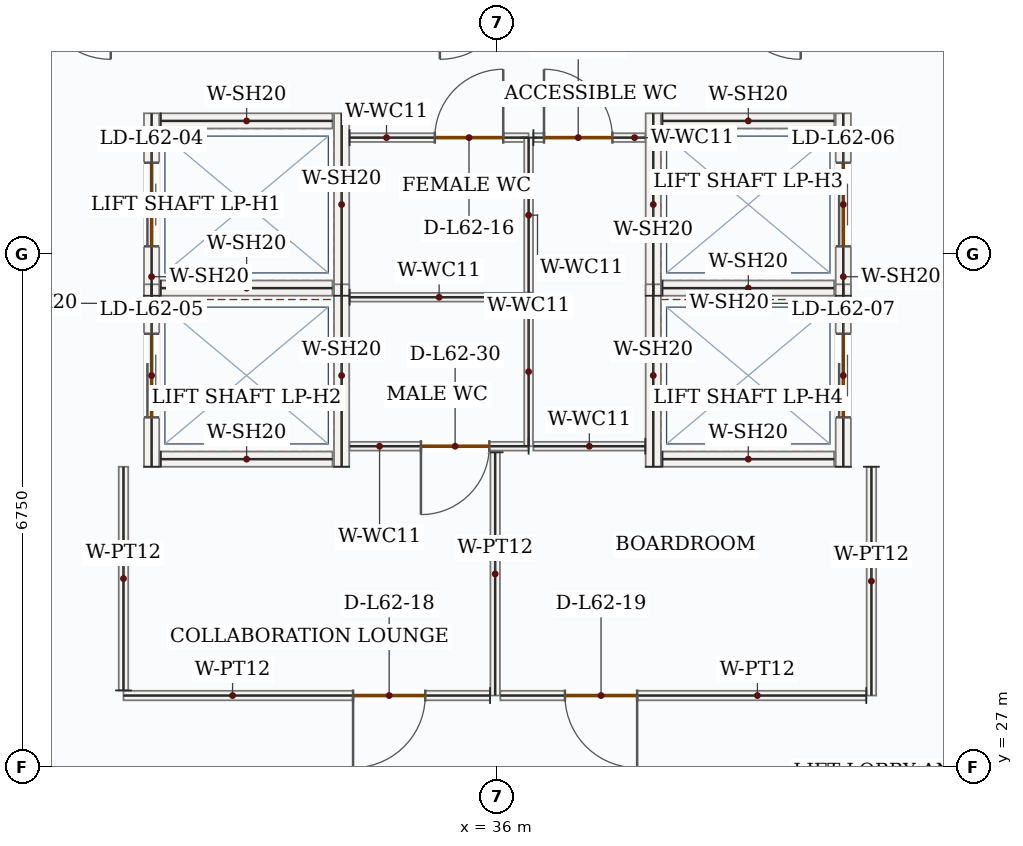
"""IFC4 building model, lengths in metres.
Left out: names, types, materials, properties, quantities, classifications, styles, units other than length and angle.
Written with IfcOpenShell. Run it as: python <this file> out.ifc"""

import sys

from ifc_helpers import new_model, si_unit, direction, frame, frame_2d, origin, place, context, subcontext, project, spatial, rectangle, extrude, source, transform, mapped, element, fill, save


model = new_model("IFC4")
c1 = context("Model", 3, precision=1e-05, world=origin(), true_north=direction((0.0, 1.0)))
c2 = subcontext(c1, "Body", "Model", "MODEL_VIEW")
j1 = project(units=[si_unit("LENGTHUNIT", "METRE"), si_unit("PLANEANGLEUNIT", "RADIAN")], contexts=[c1])
p1 = place(None, origin())
s1 = spatial("IfcSite", under=j1, at=p1, CompositionType="ELEMENT")
p2 = place(p1, origin())
s2 = spatial("IfcBuilding", under=s1, at=p2, CompositionType="ELEMENT")
p3 = place(p2, frame((0.0, 0.0, 261.6)))
s3 = spatial("IfcBuildingStorey", under=s2, at=p3, CompositionType="ELEMENT", Elevation=261.6)
p4 = place(p3, frame((31.45, 33.2, 0.0), z_axis=(0.0, 0.0, 1.0), x_axis=(0.0, 1.0, 0.0)))
e1 = element("IfcWall", 1, at=p4, inside=s3, PredefinedType="SOLIDWALL", context=c2, shape_type="SweptSolid", body=[
    extrude(rectangle(XDim=2.4, YDim=0.2, at=frame_2d((1.2, 0.0))), origin(), (0.0, 0.0, 1.0), 3.5),
])
p5 = place(p4, frame((0.65, 0.0, 0.0)))
e2 = element("IfcOpeningElement", 2, at=p5, cuts=e1, PredefinedType="OPENING", context=c2, shape_type="SweptSolid", body=[
    extrude(rectangle(XDim=1.1, YDim=2.15, at=frame_2d((0.55, 1.075))), frame((0.0, 0.11, 0.0), z_axis=(0.0, -1.0, 0.0), x_axis=(1.0, 0.0, 0.0)), (0.0, 0.0, 1.0), 0.22),
])
m1 = source(origin(), c2, "Body", "SweptSolid", [
    extrude(rectangle(XDim=2.4, YDim=0.2, at=frame_2d((1.2, 0.0))), origin(), (0.0, 0.0, 1.0), 3.5),
])
p6 = place(p3, frame((33.95, 33.2, 0.0), z_axis=(0.0, 0.0, 1.0), x_axis=(0.0, 1.0, 0.0)))
e3 = element("IfcWall", 3, at=p6, inside=s3, PredefinedType="SOLIDWALL", context=c2, shape_type="MappedRepresentation", body=[
    mapped(m1, transform((0.0, 0.0, 0.0), x_axis=(1.0, 0.0, 0.0), y_axis=(0.0, 1.0, 0.0), z_axis=(0.0, 0.0, 1.0), scale=1.0)),
])
m2 = source(origin(), c2, "Body", "SweptSolid", [
    extrude(rectangle(XDim=2.26, YDim=0.2, at=frame_2d((1.13, 0.0))), origin(), (0.0, 0.0, 1.0), 3.5),
])
for number, where, z_axis, x_axis in (
    (4, (31.57, 33.3, 0.0), (0.0, 0.0, 1.0), (1.0, 0.0, 0.0)),
    (5, (31.57, 35.5, 0.0), (0.0, 0.0, 1.0), (1.0, 0.0, 0.0)),
):
    element("IfcWall", number, at=place(p3, frame(where, z_axis=z_axis, x_axis=x_axis)), inside=s3, PredefinedType="SOLIDWALL", context=c2, shape_type="MappedRepresentation", body=[
        mapped(m2, transform((0.0, 0.0, 0.0), x_axis=(1.0, 0.0, 0.0), y_axis=(0.0, 1.0, 0.0), z_axis=(0.0, 0.0, 1.0), scale=1.0)),
    ])
p7 = place(p3, frame((31.45, 30.95, 0.0), z_axis=(0.0, 0.0, 1.0), x_axis=(0.0, 1.0, 0.0)))
e6 = element("IfcWall", 6, at=p7, inside=s3, PredefinedType="SOLIDWALL", context=c2, shape_type="SweptSolid", body=[
    extrude(rectangle(XDim=2.4, YDim=0.2, at=frame_2d((1.2, 0.0))), origin(), (0.0, 0.0, 1.0), 3.5),
])
p8 = place(p7, frame((0.65, 0.0, 0.0)))
e7 = element("IfcOpeningElement", 7, at=p8, cuts=e6, PredefinedType="OPENING", context=c2, shape_type="SweptSolid", body=[
    extrude(rectangle(XDim=1.1, YDim=2.15, at=frame_2d((0.55, 1.075))), frame((0.0, 0.11, 0.0), z_axis=(0.0, -1.0, 0.0), x_axis=(1.0, 0.0, 0.0)), (0.0, 0.0, 1.0), 0.22),
])
p9 = place(p3, frame((33.95, 30.95, 0.0), z_axis=(0.0, 0.0, 1.0), x_axis=(0.0, 1.0, 0.0)))
e8 = element("IfcWall", 8, at=p9, inside=s3, PredefinedType="SOLIDWALL", context=c2, shape_type="MappedRepresentation", body=[
    mapped(m1, transform((0.0, 0.0, 0.0), x_axis=(1.0, 0.0, 0.0), y_axis=(0.0, 1.0, 0.0), z_axis=(0.0, 0.0, 1.0), scale=1.0)),
])
p10 = place(p3, frame((31.57, 31.05, 0.0), z_axis=(0.0, 0.0, 1.0), x_axis=(1.0, 0.0, 0.0)))
e9 = element("IfcWall", 9, at=p10, inside=s3, PredefinedType="SOLIDWALL", context=c2, shape_type="MappedRepresentation", body=[
    mapped(m2, transform((0.0, 0.0, 0.0), x_axis=(1.0, 0.0, 0.0), y_axis=(0.0, 1.0, 0.0), z_axis=(0.0, 0.0, 1.0), scale=1.0)),
])
p11 = place(p3, frame((38.05, 33.2, 0.0), z_axis=(0.0, 0.0, 1.0), x_axis=(0.0, 1.0, 0.0)))
e10 = element("IfcWall", 10, at=p11, inside=s3, PredefinedType="SOLIDWALL", context=c2, shape_type="MappedRepresentation", body=[
    mapped(m1, transform((0.0, 0.0, 0.0), x_axis=(1.0, 0.0, 0.0), y_axis=(0.0, 1.0, 0.0), z_axis=(0.0, 0.0, 1.0), scale=1.0)),
])
p12 = place(p3, frame((40.55, 33.2, 0.0), z_axis=(0.0, 0.0, 1.0), x_axis=(0.0, 1.0, 0.0)))
e11 = element("IfcWall", 11, at=p12, inside=s3, PredefinedType="SOLIDWALL", context=c2, shape_type="SweptSolid", body=[
    extrude(rectangle(XDim=2.4, YDim=0.2, at=frame_2d((1.2, 0.0))), origin(), (0.0, 0.0, 1.0), 3.5),
])
p13 = place(p12, frame((0.65, 0.0, 0.0)))
e12 = element("IfcOpeningElement", 12, at=p13, cuts=e11, PredefinedType="OPENING", context=c2, shape_type="SweptSolid", body=[
    extrude(rectangle(XDim=1.1, YDim=2.15, at=frame_2d((0.55, 1.075))), frame((0.0, 0.11, 0.0), z_axis=(0.0, -1.0, 0.0), x_axis=(1.0, 0.0, 0.0)), (0.0, 0.0, 1.0), 0.22),
])
for number, where, z_axis, x_axis in (
    (13, (38.17, 33.3, 0.0), (0.0, 0.0, 1.0), (1.0, 0.0, 0.0)),
    (14, (38.17, 35.5, 0.0), (0.0, 0.0, 1.0), (1.0, 0.0, 0.0)),
):
    element("IfcWall", number, at=place(p3, frame(where, z_axis=z_axis, x_axis=x_axis)), inside=s3, PredefinedType="SOLIDWALL", context=c2, shape_type="MappedRepresentation", body=[
        mapped(m2, transform((0.0, 0.0, 0.0), x_axis=(1.0, 0.0, 0.0), y_axis=(0.0, 1.0, 0.0), z_axis=(0.0, 0.0, 1.0), scale=1.0)),
    ])
p14 = place(p3, frame((38.05, 30.95, 0.0), z_axis=(0.0, 0.0, 1.0), x_axis=(0.0, 1.0, 0.0)))
e15 = element("IfcWall", 15, at=p14, inside=s3, PredefinedType="SOLIDWALL", context=c2, shape_type="MappedRepresentation", body=[
    mapped(m1, transform((0.0, 0.0, 0.0), x_axis=(1.0, 0.0, 0.0), y_axis=(0.0, 1.0, 0.0), z_axis=(0.0, 0.0, 1.0), scale=1.0)),
])
p15 = place(p3, frame((40.55, 30.95, 0.0), z_axis=(0.0, 0.0, 1.0), x_axis=(0.0, 1.0, 0.0)))
e16 = element("IfcWall", 16, at=p15, inside=s3, PredefinedType="SOLIDWALL", context=c2, shape_type="SweptSolid", body=[
    extrude(rectangle(XDim=2.4, YDim=0.2, at=frame_2d((1.2, 0.0))), origin(), (0.0, 0.0, 1.0), 3.5),
])
p16 = place(p15, frame((0.65, 0.0, 0.0)))
e17 = element("IfcOpeningElement", 17, at=p16, cuts=e16, PredefinedType="OPENING", context=c2, shape_type="SweptSolid", body=[
    extrude(rectangle(XDim=1.1, YDim=2.15, at=frame_2d((0.55, 1.075))), frame((0.0, 0.11, 0.0), z_axis=(0.0, -1.0, 0.0), x_axis=(1.0, 0.0, 0.0)), (0.0, 0.0, 1.0), 0.22),
])
p17 = place(p3, frame((38.17, 31.05, 0.0), z_axis=(0.0, 0.0, 1.0), x_axis=(1.0, 0.0, 0.0)))
e18 = element("IfcWall", 18, at=p17, inside=s3, PredefinedType="SOLIDWALL", context=c2, shape_type="MappedRepresentation", body=[
    mapped(m2, transform((0.0, 0.0, 0.0), x_axis=(1.0, 0.0, 0.0), y_axis=(0.0, 1.0, 0.0), z_axis=(0.0, 0.0, 1.0), scale=1.0)),
])
p18 = place(p3, frame((36.41, 31.22, 0.0), z_axis=(0.0, 0.0, 1.0), x_axis=(-1.0, 0.0, 0.0)))
e19 = element("IfcWall", 19, at=p18, inside=s3, PredefinedType="PARTITIONING", context=c2, shape_type="SweptSolid", body=[
    extrude(rectangle(XDim=2.355, YDim=0.115, at=frame_2d((1.177, 0.0))), origin(), (0.0, 0.0, 1.0), 3.5),
])
p19 = place(p18, frame((0.517, 0.0, 0.0)))
e20 = element("IfcOpeningElement", 20, at=p19, cuts=e19, PredefinedType="OPENING", context=c2, shape_type="SweptSolid", body=[
    extrude(rectangle(XDim=0.9, YDim=2.1, at=frame_2d((0.45, 1.05))), frame((0.0, 0.067, 0.0), z_axis=(0.0, -1.0, 0.0), x_axis=(1.0, 0.0, 0.0)), (0.0, 0.0, 1.0), 0.135),
])
m3 = source(origin(), c2, "Body", "SweptSolid", [
    extrude(rectangle(XDim=2.355, YDim=0.115, at=frame_2d((1.177, 0.0))), origin(), (0.0, 0.0, 1.0), 3.5),
])
p20 = place(p3, frame((34.055, 33.18, 0.0), z_axis=(0.0, 0.0, 1.0), x_axis=(1.0, 0.0, 0.0)))
e21 = element("IfcWall", 21, at=p20, inside=s3, PredefinedType="PARTITIONING", context=c2, shape_type="MappedRepresentation", body=[
    mapped(m3, transform((0.0, 0.0, 0.0), x_axis=(1.0, 0.0, 0.0), y_axis=(0.0, 1.0, 0.0), z_axis=(0.0, 0.0, 1.0), scale=1.0)),
])
m4 = source(origin(), c2, "Body", "SweptSolid", [
    extrude(rectangle(XDim=1.96, YDim=0.115, at=frame_2d((0.98, 0.0))), origin(), (0.0, 0.0, 1.0), 3.5),
])
p21 = place(p3, frame((36.41, 33.18, 0.0), z_axis=(0.0, 0.0, 1.0), x_axis=(0.0, -1.0, 0.0)))
e22 = element("IfcWall", 22, at=p21, inside=s3, PredefinedType="PARTITIONING", context=c2, shape_type="MappedRepresentation", body=[
    mapped(m4, transform((0.0, 0.0, 0.0), x_axis=(1.0, 0.0, 0.0), y_axis=(0.0, 1.0, 0.0), z_axis=(0.0, 0.0, 1.0), scale=1.0)),
])
p22 = place(p3, frame((34.055, 35.28, 0.0), z_axis=(0.0, 0.0, 1.0), x_axis=(1.0, 0.0, 0.0)))
e23 = element("IfcWall", 23, at=p22, inside=s3, PredefinedType="PARTITIONING", context=c2, shape_type="SweptSolid", body=[
    extrude(rectangle(XDim=2.355, YDim=0.115, at=frame_2d((1.177, 0.0))), origin(), (0.0, 0.0, 1.0), 3.5),
])
p23 = place(p22, frame((1.121, 0.0, 0.0)))
e24 = element("IfcOpeningElement", 24, at=p23, cuts=e23, PredefinedType="OPENING", context=c2, shape_type="SweptSolid", body=[
    extrude(rectangle(XDim=0.9, YDim=2.1, at=frame_2d((0.45, 1.05))), frame((0.0, 0.067, 0.0), z_axis=(0.0, -1.0, 0.0), x_axis=(1.0, 0.0, 0.0)), (0.0, 0.0, 1.0), 0.135),
])
m5 = source(origin(), c2, "Body", "SweptSolid", [
    extrude(rectangle(XDim=2.04, YDim=0.115, at=frame_2d((1.02, 0.0))), origin(), (0.0, 0.0, 1.0), 3.5),
])
p24 = place(p3, frame((36.41, 35.28, 0.0), z_axis=(0.0, 0.0, 1.0), x_axis=(0.0, -1.0, 0.0)))
e25 = element("IfcWall", 25, at=p24, inside=s3, PredefinedType="PARTITIONING", context=c2, shape_type="MappedRepresentation", body=[
    mapped(m5, transform((0.0, 0.0, 0.0), x_axis=(1.0, 0.0, 0.0), y_axis=(0.0, 1.0, 0.0), z_axis=(0.0, 0.0, 1.0), scale=1.0)),
])
m6 = source(origin(), c2, "Body", "SweptSolid", [
    extrude(rectangle(XDim=1.473, YDim=0.115, at=frame_2d((0.736, 0.0))), origin(), (0.0, 0.0, 1.0), 3.5),
])
p25 = place(p3, frame((37.945, 31.22, 0.0), z_axis=(0.0, 0.0, 1.0), x_axis=(-1.0, 0.0, 0.0)))
e26 = element("IfcWall", 26, at=p25, inside=s3, PredefinedType="PARTITIONING", context=c2, shape_type="MappedRepresentation", body=[
    mapped(m6, transform((0.0, 0.0, 0.0), x_axis=(1.0, 0.0, 0.0), y_axis=(0.0, 1.0, 0.0), z_axis=(0.0, 0.0, 1.0), scale=1.0)),
])
p26 = place(p3, frame((36.472, 35.28, 0.0), z_axis=(0.0, 0.0, 1.0), x_axis=(1.0, 0.0, 0.0)))
e27 = element("IfcWall", 27, at=p26, inside=s3, PredefinedType="PARTITIONING", context=c2, shape_type="SweptSolid", body=[
    extrude(rectangle(XDim=1.473, YDim=0.115, at=frame_2d((0.736, 0.0))), origin(), (0.0, 0.0, 1.0), 3.5),
])
p27 = place(p26, frame((0.14, 0.0, 0.0)))
e28 = element("IfcOpeningElement", 28, at=p27, cuts=e27, PredefinedType="OPENING", context=c2, shape_type="SweptSolid", body=[
    extrude(rectangle(XDim=0.9, YDim=2.1, at=frame_2d((0.45, 1.05))), frame((0.0, 0.067, 0.0), z_axis=(0.0, -1.0, 0.0), x_axis=(1.0, 0.0, 0.0)), (0.0, 0.0, 1.0), 0.135),
])
m7 = source(origin(), c2, "Body", "SweptSolid", [
    extrude(rectangle(XDim=3.2, YDim=0.125, at=frame_2d((1.6, 0.0))), origin(), (0.0, 0.0, 1.0), 3.5),
])
p28 = place(p3, frame((35.97, 31.14, 0.0), z_axis=(0.0, 0.0, 1.0), x_axis=(0.0, -1.0, 0.0)))
e29 = element("IfcWall", 29, at=p28, inside=s3, PredefinedType="PARTITIONING", context=c2, shape_type="MappedRepresentation", body=[
    mapped(m7, transform((0.0, 0.0, 0.0), x_axis=(1.0, 0.0, 0.0), y_axis=(0.0, 1.0, 0.0), z_axis=(0.0, 0.0, 1.0), scale=1.0)),
])
p29 = place(p3, frame((35.903, 27.94, 0.0), z_axis=(0.0, 0.0, 1.0), x_axis=(-1.0, 0.0, 0.0)))
e30 = element("IfcWall", 30, at=p29, inside=s3, PredefinedType="PARTITIONING", context=c2, shape_type="SweptSolid", body=[
    extrude(rectangle(XDim=4.823, YDim=0.125, at=frame_2d((2.411, 0.0))), origin(), (0.0, 0.0, 1.0), 3.5),
])
p30 = place(p29, frame((0.852, 0.0, 0.0)))
e31 = element("IfcOpeningElement", 31, at=p30, cuts=e30, PredefinedType="OPENING", context=c2, shape_type="SweptSolid", body=[
    extrude(rectangle(XDim=0.95, YDim=2.15, at=frame_2d((0.475, 1.075))), frame((0.0, 0.073, 0.0), z_axis=(0.0, -1.0, 0.0), x_axis=(1.0, 0.0, 0.0)), (0.0, 0.0, 1.0), 0.145),
])
m8 = source(origin(), c2, "Body", "SweptSolid", [
    extrude(rectangle(XDim=2.942, YDim=0.125, at=frame_2d((1.471, 0.0))), origin(), (0.0, 0.0, 1.0), 3.5),
])
p31 = place(p3, frame((31.08, 28.008, 0.0), z_axis=(0.0, 0.0, 1.0), x_axis=(0.0, 1.0, 0.0)))
e32 = element("IfcWall", 32, at=p31, inside=s3, PredefinedType="PARTITIONING", context=c2, shape_type="MappedRepresentation", body=[
    mapped(m8, transform((0.0, 0.0, 0.0), x_axis=(1.0, 0.0, 0.0), y_axis=(0.0, 1.0, 0.0), z_axis=(0.0, 0.0, 1.0), scale=1.0)),
])
m9 = source(origin(), c2, "Body", "SweptSolid", [
    extrude(rectangle(XDim=3.01, YDim=0.125, at=frame_2d((1.505, 0.0))), origin(), (0.0, 0.0, 1.0), 3.5),
])
p32 = place(p3, frame((40.92, 30.95, 0.0), z_axis=(0.0, 0.0, 1.0), x_axis=(0.0, -1.0, 0.0)))
e33 = element("IfcWall", 33, at=p32, inside=s3, PredefinedType="PARTITIONING", context=c2, shape_type="MappedRepresentation", body=[
    mapped(m9, transform((0.0, 0.0, 0.0), x_axis=(1.0, 0.0, 0.0), y_axis=(0.0, 1.0, 0.0), z_axis=(0.0, 0.0, 1.0), scale=1.0)),
])
p33 = place(p3, frame((40.853, 27.94, 0.0), z_axis=(0.0, 0.0, 1.0), x_axis=(-1.0, 0.0, 0.0)))
e34 = element("IfcWall", 34, at=p33, inside=s3, PredefinedType="PARTITIONING", context=c2, shape_type="SweptSolid", body=[
    extrude(rectangle(XDim=4.815, YDim=0.125, at=frame_2d((2.407, 0.0))), origin(), (0.0, 0.0, 1.0), 3.5),
])
p34 = place(p33, frame((3.015, 0.0, 0.0)))
e35 = element("IfcOpeningElement", 35, at=p34, cuts=e34, PredefinedType="OPENING", context=c2, shape_type="SweptSolid", body=[
    extrude(rectangle(XDim=0.95, YDim=2.15, at=frame_2d((0.475, 1.075))), frame((0.0, 0.073, 0.0), z_axis=(0.0, -1.0, 0.0), x_axis=(1.0, 0.0, 0.0)), (0.0, 0.0, 1.0), 0.145),
])
m10 = source(origin(), c2, "Body", "SweptSolid", [
    extrude(rectangle(XDim=1.1, YDim=2.15, at=frame_2d((0.55, 1.075))), frame((0.0, 0.025, 0.0), z_axis=(0.0, -1.0, 0.0), x_axis=(1.0, 0.0, 0.0)), (0.0, 0.0, 1.0), 0.05),
])
p35 = place(p5, origin())
e36 = element("IfcDoor", 36, at=p35, inside=s3, OperationType="DOUBLE_DOOR_SLIDING", PredefinedType="DOOR", context=c2, shape_type="MappedRepresentation", body=[
    mapped(m10, transform((0.0, 0.0, 0.0), x_axis=(1.0, 0.0, 0.0), y_axis=(0.0, 1.0, 0.0), z_axis=(0.0, 0.0, 1.0), scale=1.0)),
])
fill(e2, e36)
p36 = place(p8, origin())
e37 = element("IfcDoor", 37, at=p36, inside=s3, OperationType="DOUBLE_DOOR_SLIDING", PredefinedType="DOOR", context=c2, shape_type="MappedRepresentation", body=[
    mapped(m10, transform((0.0, 0.0, 0.0), x_axis=(1.0, 0.0, 0.0), y_axis=(0.0, 1.0, 0.0), z_axis=(0.0, 0.0, 1.0), scale=1.0)),
])
fill(e7, e37)
p37 = place(p13, origin())
e38 = element("IfcDoor", 38, at=p37, inside=s3, OperationType="DOUBLE_DOOR_SLIDING", PredefinedType="DOOR", context=c2, shape_type="MappedRepresentation", body=[
    mapped(m10, transform((0.0, 0.0, 0.0), x_axis=(1.0, 0.0, 0.0), y_axis=(0.0, 1.0, 0.0), z_axis=(0.0, 0.0, 1.0), scale=1.0)),
])
fill(e12, e38)
p38 = place(p16, origin())
e39 = element("IfcDoor", 39, at=p38, inside=s3, OperationType="DOUBLE_DOOR_SLIDING", PredefinedType="DOOR", context=c2, shape_type="MappedRepresentation", body=[
    mapped(m10, transform((0.0, 0.0, 0.0), x_axis=(1.0, 0.0, 0.0), y_axis=(0.0, 1.0, 0.0), z_axis=(0.0, 0.0, 1.0), scale=1.0)),
])
fill(e17, e39)
m11 = source(origin(), c2, "Body", "SweptSolid", [
    extrude(rectangle(XDim=0.9, YDim=2.1, at=frame_2d((0.45, 1.05))), frame((0.0, 0.025, 0.0), z_axis=(0.0, -1.0, 0.0), x_axis=(1.0, 0.0, 0.0)), (0.0, 0.0, 1.0), 0.05),
])
p39 = place(p23, origin())
e40 = element("IfcDoor", 40, at=p39, inside=s3, OperationType="SINGLE_SWING_RIGHT", PredefinedType="DOOR", context=c2, shape_type="MappedRepresentation", body=[
    mapped(m11, transform((0.0, 0.0, 0.0), x_axis=(1.0, 0.0, 0.0), y_axis=(0.0, 1.0, 0.0), z_axis=(0.0, 0.0, 1.0), scale=1.0)),
])
fill(e24, e40)
p40 = place(p27, origin())
e41 = element("IfcDoor", 41, at=p40, inside=s3, OperationType="SINGLE_SWING_LEFT", PredefinedType="DOOR", context=c2, shape_type="MappedRepresentation", body=[
    mapped(m11, transform((0.0, 0.0, 0.0), x_axis=(1.0, 0.0, 0.0), y_axis=(0.0, 1.0, 0.0), z_axis=(0.0, 0.0, 1.0), scale=1.0)),
])
fill(e28, e41)
m12 = source(origin(), c2, "Body", "SweptSolid", [
    extrude(rectangle(XDim=0.95, YDim=2.15, at=frame_2d((0.475, 1.075))), frame((0.0, 0.025, 0.0), z_axis=(0.0, -1.0, 0.0), x_axis=(1.0, 0.0, 0.0)), (0.0, 0.0, 1.0), 0.05),
])
p41 = place(p30, origin())
e42 = element("IfcDoor", 42, at=p41, inside=s3, OperationType="SINGLE_SWING_RIGHT", PredefinedType="DOOR", context=c2, shape_type="MappedRepresentation", body=[
    mapped(m12, transform((0.0, 0.0, 0.0), x_axis=(1.0, 0.0, 0.0), y_axis=(0.0, 1.0, 0.0), z_axis=(0.0, 0.0, 1.0), scale=1.0)),
])
fill(e31, e42)
p42 = place(p34, origin())
e43 = element("IfcDoor", 43, at=p42, inside=s3, OperationType="SINGLE_SWING_LEFT", PredefinedType="DOOR", context=c2, shape_type="MappedRepresentation", body=[
    mapped(m12, transform((0.0, 0.0, 0.0), x_axis=(1.0, 0.0, 0.0), y_axis=(0.0, 1.0, 0.0), z_axis=(0.0, 0.0, 1.0), scale=1.0)),
])
fill(e35, e43)
p43 = place(p19, origin())
e44 = element("IfcDoor", 44, at=p43, inside=s3, OperationType="SINGLE_SWING_RIGHT", PredefinedType="DOOR", context=c2, shape_type="MappedRepresentation", body=[
    mapped(m11, transform((0.0, 0.0, 0.0), x_axis=(1.0, 0.0, 0.0), y_axis=(0.0, 1.0, 0.0), z_axis=(0.0, 0.0, 1.0), scale=1.0)),
])
fill(e20, e44)
save(model, sys.argv[1])
